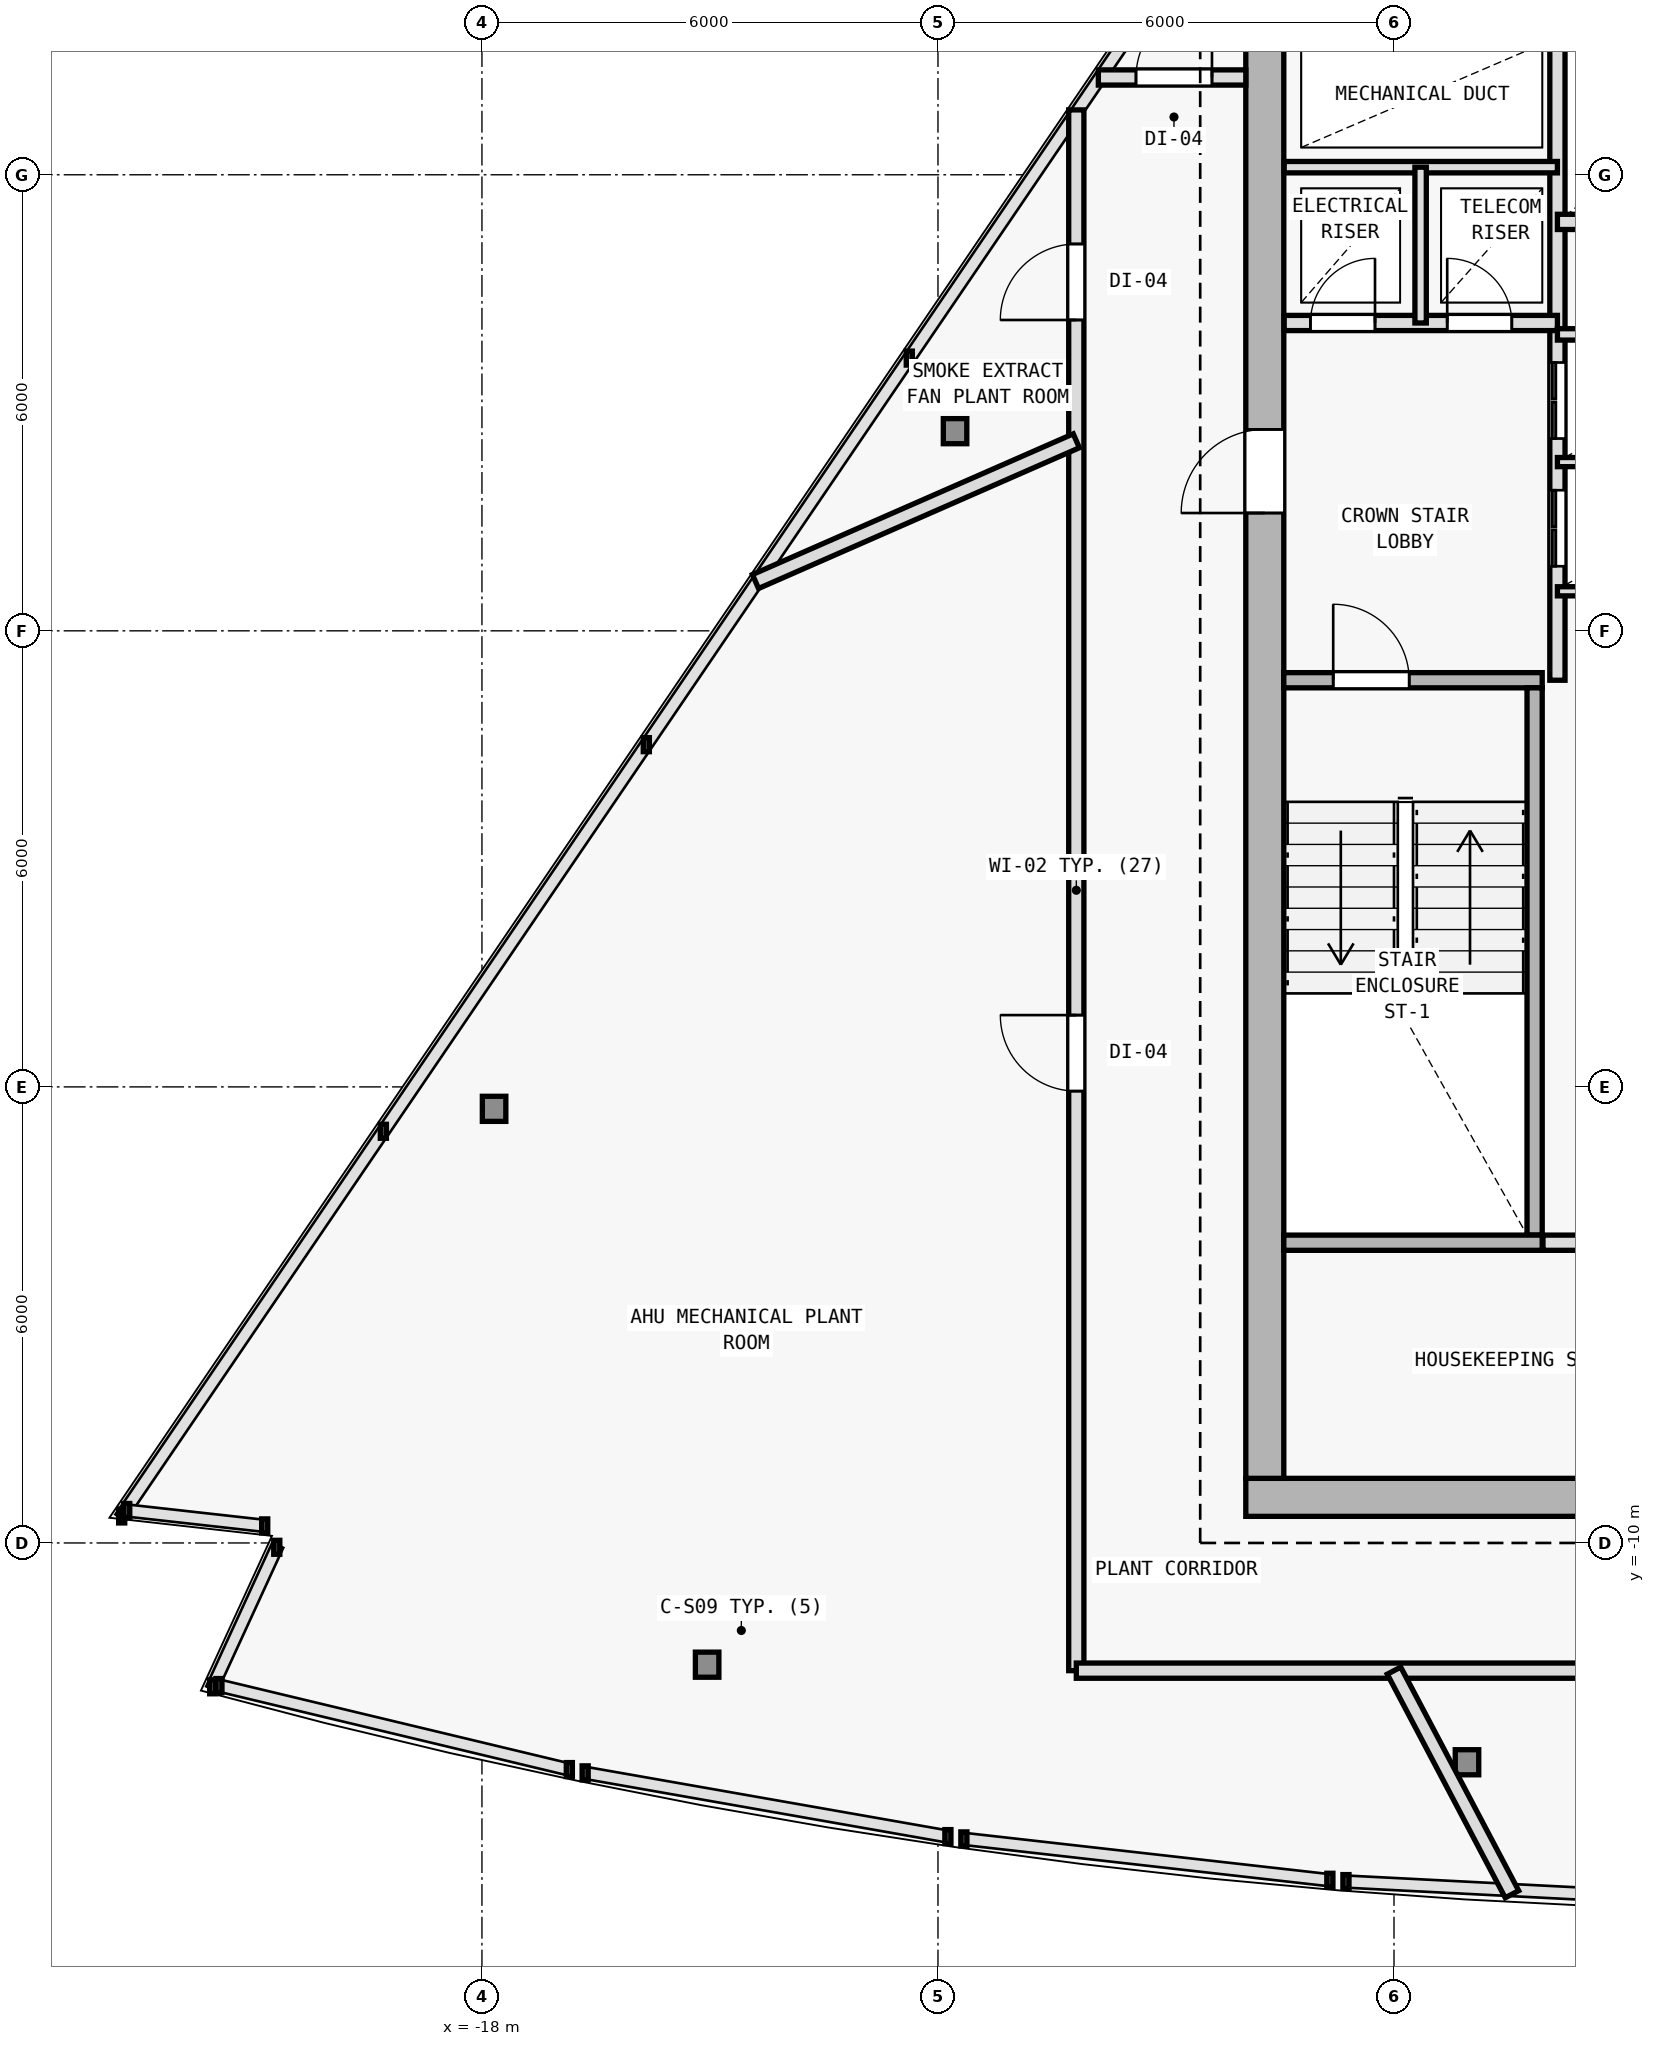
"""IFC4 building model, lengths in metres.
Left out: names, types, materials, properties, quantities, classifications, styles, units other than length and angle.
Written with IfcOpenShell. Run it as: python <this file> out.ifc"""

import sys

from ifc_helpers import new_model, si_unit, direction, frame, frame_2d, origin, origin_2d, place, context, subcontext, project, spatial, rectangle, i_section, extrude, element, fill, save


model = new_model("IFC4")
c1 = context("Model", 3, precision=1e-05, world=origin(), true_north=direction((0.0, 1.0)))
c2 = subcontext(c1, "Body", "Model", "MODEL_VIEW")
j1 = project(units=[si_unit("LENGTHUNIT", "METRE"), si_unit("PLANEANGLEUNIT", "RADIAN")], contexts=[c1])
p1 = place(None, origin())
s1 = spatial("IfcSite", under=j1, at=p1, CompositionType="ELEMENT")
p2 = place(p1, origin())
s2 = spatial("IfcBuilding", under=s1, at=p2, CompositionType="ELEMENT")
p3 = place(p2, frame((0.0, 0.0, 312.0)))
s3 = spatial("IfcBuildingStorey", under=s2, at=p3, CompositionType="ELEMENT", Elevation=312.0)
for number, where, z_axis, x_axis in (
    (1, (-7.7, -9.4, 0.0), (0.0, 0.0, 1.0), (1.0, 0.0, 0.0)),
    (2, (-7.7, 2.0, 0.0), (0.0, 0.0, 1.0), (1.0, 0.0, 0.0)),
):
    element("IfcColumn", number, at=place(p3, frame(where, z_axis=z_axis, x_axis=x_axis)), inside=s3, PredefinedType="COLUMN", context=c2, shape_type="SweptSolid", body=[
        extrude(i_section(OverallWidth=0.374, OverallDepth=0.372, WebThickness=0.012, FlangeThickness=0.02, FilletRadius=0.015, at=origin_2d()), origin(), (0.0, 0.0, 1.0), 3.6),
    ])
for number, where, z_axis, x_axis in (
    (3, (-15.037, -11.602, 0.0), (0.0, 0.0, 1.0), (1.0, 0.0, 0.0)),
    (4, (-5.04, -12.885, 0.0), (0.0, 0.0, 1.0), (1.0, 0.0, 0.0)),
    (5, (-17.84, -4.289, 0.0), (0.0, 0.0, 1.0), (1.0, 0.0, 0.0)),
    (6, (-11.775, 4.627, 0.0), (0.0, 0.0, 1.0), (1.0, 0.0, 0.0)),
):
    element("IfcColumn", number, at=place(p3, frame(where, z_axis=z_axis, x_axis=x_axis)), inside=s3, PredefinedType="COLUMN", context=c2, shape_type="SweptSolid", body=[
        extrude(i_section(OverallWidth=0.309, OverallDepth=0.33, WebThickness=0.011, FlangeThickness=0.019, FilletRadius=0.027, at=origin_2d()), origin(), (0.0, 0.0, 1.0), 3.6),
    ])
p4 = place(p3, frame((-7.95, -9.4, 0.0), z_axis=(0.0, 0.0, 1.0), x_axis=(1.0, 0.0, 0.0)))
e7 = element("IfcWall", 7, at=p4, inside=s3, PredefinedType="SHEAR", context=c2, shape_type="SweptSolid", body=[
    extrude(rectangle(XDim=15.9, YDim=0.5, at=frame_2d((7.95, 0.0))), origin(), (0.0, 0.0, 1.0), 3.34),
])
p5 = place(p4, frame((9.6, 0.0, 0.0)))
e8 = element("IfcOpeningElement", 8, at=p5, cuts=e7, PredefinedType="OPENING", context=c2, shape_type="SweptSolid", body=[
    extrude(rectangle(XDim=1.5, YDim=2.2, at=frame_2d((0.75, 1.1))), frame((0.0, 0.26, 0.0), z_axis=(0.0, -1.0, 0.0), x_axis=(1.0, 0.0, 0.0)), (0.0, 0.0, 1.0), 0.52),
])
p6 = place(p3, frame((-7.7, -9.15, 0.0), z_axis=(0.0, 0.0, 1.0), x_axis=(0.0, 1.0, 0.0)))
e9 = element("IfcWall", 9, at=p6, inside=s3, PredefinedType="SHEAR", context=c2, shape_type="SweptSolid", body=[
    extrude(rectangle(XDim=19.1, YDim=0.5, at=frame_2d((9.55, 0.0))), origin(), (0.0, 0.0, 1.0), 3.34),
])
p7 = place(p6, frame((12.7, 0.0, 0.0)))
e10 = element("IfcOpeningElement", 10, at=p7, cuts=e9, PredefinedType="OPENING", context=c2, shape_type="SweptSolid", body=[
    extrude(rectangle(XDim=1.1, YDim=2.15, at=frame_2d((0.55, 1.075))), frame((0.0, 0.26, 0.0), z_axis=(0.0, -1.0, 0.0), x_axis=(1.0, 0.0, 0.0)), (0.0, 0.0, 1.0), 0.52),
])
p8 = place(p3, frame((-7.45, 1.35, 0.0), z_axis=(0.0, 0.0, 1.0), x_axis=(1.0, 0.0, 0.0)))
e11 = element("IfcWall", 11, at=p8, inside=s3, PredefinedType="SOLIDWALL", context=c2, shape_type="SweptSolid", body=[
    extrude(rectangle(XDim=3.4, YDim=0.2, at=frame_2d((1.7, 0.0))), origin(), (0.0, 0.0, 1.0), 3.34),
])
p9 = place(p8, frame((0.65, 0.0, 0.0)))
e12 = element("IfcOpeningElement", 12, at=p9, cuts=e11, PredefinedType="OPENING", context=c2, shape_type="SweptSolid", body=[
    extrude(rectangle(XDim=1.0, YDim=2.15, at=frame_2d((0.5, 1.075))), frame((0.0, 0.11, 0.0), z_axis=(0.0, -1.0, 0.0), x_axis=(1.0, 0.0, 0.0)), (0.0, 0.0, 1.0), 0.22),
])
p10 = place(p3, frame((-4.15, -5.95, 0.0), z_axis=(0.0, 0.0, 1.0), x_axis=(0.0, 1.0, 0.0)))
e13 = element("IfcWall", 13, at=p10, inside=s3, PredefinedType="SOLIDWALL", context=c2, shape_type="SweptSolid", body=[
    extrude(rectangle(XDim=7.2, YDim=0.2, at=frame_2d((3.6, 0.0))), origin(), (0.0, 0.0, 1.0), 3.34),
])
p11 = place(p3, frame((-3.85, 1.35, 0.0), z_axis=(0.0, 0.0, 1.0), x_axis=(0.0, 1.0, 0.0)))
e14 = element("IfcWall", 14, at=p11, inside=s3, PredefinedType="SOLIDWALL", context=c2, shape_type="SweptSolid", body=[
    extrude(rectangle(XDim=8.595, YDim=0.2, at=frame_2d((4.297, 0.0))), origin(), (0.0, 0.0, 1.0), 3.34),
])
p12 = place(p11, frame((1.5, 0.0, 0.0)))
e15 = element("IfcOpeningElement", 15, at=p12, cuts=e14, PredefinedType="OPENING", context=c2, shape_type="SweptSolid", body=[
    extrude(rectangle(XDim=1.0, YDim=2.15, at=frame_2d((0.5, 1.075))), frame((0.0, 0.11, 0.0), z_axis=(0.0, -1.0, 0.0), x_axis=(1.0, 0.0, 0.0)), (0.0, 0.0, 1.0), 0.22),
])
p13 = place(p11, frame((3.18, 0.0, 0.0)))
e16 = element("IfcOpeningElement", 16, at=p13, cuts=e14, PredefinedType="OPENING", context=c2, shape_type="SweptSolid", body=[
    extrude(rectangle(XDim=1.0, YDim=2.15, at=frame_2d((0.5, 1.075))), frame((0.0, 0.11, 0.0), z_axis=(0.0, -1.0, 0.0), x_axis=(1.0, 0.0, 0.0)), (0.0, 0.0, 1.0), 0.22),
])
p14 = place(p3, frame((-7.445, 6.05, 0.0), z_axis=(0.0, 0.0, 1.0), x_axis=(1.0, 0.0, 0.0)))
e17 = element("IfcWall", 17, at=p14, inside=s3, PredefinedType="SOLIDWALL", context=c2, shape_type="SweptSolid", body=[
    extrude(rectangle(XDim=3.595, YDim=0.2, at=frame_2d((1.797, 0.0))), origin(), (0.0, 0.0, 1.0), 3.34),
])
p15 = place(p14, frame((0.345, 0.0, 0.0)))
e18 = element("IfcOpeningElement", 18, at=p15, cuts=e17, PredefinedType="OPENING", context=c2, shape_type="SweptSolid", body=[
    extrude(rectangle(XDim=0.85, YDim=2.1, at=frame_2d((0.425, 1.05))), frame((0.0, 0.11, 0.0), z_axis=(0.0, -1.0, 0.0), x_axis=(1.0, 0.0, 0.0)), (0.0, 0.0, 1.0), 0.22),
])
p16 = place(p14, frame((2.145, 0.0, 0.0)))
e19 = element("IfcOpeningElement", 19, at=p16, cuts=e17, PredefinedType="OPENING", context=c2, shape_type="SweptSolid", body=[
    extrude(rectangle(XDim=0.85, YDim=2.1, at=frame_2d((0.425, 1.05))), frame((0.0, 0.11, 0.0), z_axis=(0.0, -1.0, 0.0), x_axis=(1.0, 0.0, 0.0)), (0.0, 0.0, 1.0), 0.22),
])
p17 = place(p3, frame((-7.445, 8.1, 0.0), z_axis=(0.0, 0.0, 1.0), x_axis=(1.0, 0.0, 0.0)))
e20 = element("IfcWall", 20, at=p17, inside=s3, PredefinedType="PARTITIONING", context=c2, shape_type="SweptSolid", body=[
    extrude(rectangle(XDim=3.595, YDim=0.15, at=frame_2d((1.797, 0.0))), origin(), (0.0, 0.0, 1.0), 3.34),
])
p18 = place(p3, frame((-5.65, 6.05, 0.0), z_axis=(0.0, 0.0, 1.0), x_axis=(0.0, 1.0, 0.0)))
e21 = element("IfcWall", 21, at=p18, inside=s3, PredefinedType="PARTITIONING", context=c2, shape_type="SweptSolid", body=[
    extrude(rectangle(XDim=2.05, YDim=0.15, at=frame_2d((1.025, 0.0))), origin(), (0.0, 0.0, 1.0), 3.34),
])
for number, where, z_axis, x_axis in (
    (22, (-3.85, 2.52, 0.0), (0.0, 0.0, 1.0), (1.0, 0.0, 0.0)),
    (23, (-3.85, 4.22, 0.0), (0.0, 0.0, 1.0), (1.0, 0.0, 0.0)),
):
    element("IfcWall", number, at=place(p3, frame(where, z_axis=z_axis, x_axis=x_axis)), inside=s3, PredefinedType="PARTITIONING", context=c2, shape_type="SweptSolid", body=[
        extrude(rectangle(XDim=2.9, YDim=0.12, at=frame_2d((1.45, 0.0))), origin(), (0.0, 0.0, 1.0), 3.34),
    ])
p19 = place(p3, frame((-3.85, 5.9, 0.0), z_axis=(0.0, 0.0, 1.0), x_axis=(1.0, 0.0, 0.0)))
e24 = element("IfcWall", 24, at=p19, inside=s3, PredefinedType="PARTITIONING", context=c2, shape_type="SweptSolid", body=[
    extrude(rectangle(XDim=2.9, YDim=0.15, at=frame_2d((1.45, 0.0))), origin(), (0.0, 0.0, 1.0), 3.34),
])
p20 = place(p3, frame((-3.85, 7.38, 0.0), z_axis=(0.0, 0.0, 1.0), x_axis=(1.0, 0.0, 0.0)))
e25 = element("IfcWall", 25, at=p20, inside=s3, PredefinedType="SOLIDWALL", context=c2, shape_type="SweptSolid", body=[
    extrude(rectangle(XDim=2.9, YDim=0.2, at=frame_2d((1.45, 0.0))), origin(), (0.0, 0.0, 1.0), 3.34),
])
p21 = place(p20, frame((0.85, 0.0, 0.0)))
e26 = element("IfcOpeningElement", 26, at=p21, cuts=e25, PredefinedType="OPENING", context=c2, shape_type="SweptSolid", body=[
    extrude(rectangle(XDim=1.2, YDim=2.2, at=frame_2d((0.6, 1.1))), frame((0.0, 0.11, 0.0), z_axis=(0.0, -1.0, 0.0), x_axis=(1.0, 0.0, 0.0)), (0.0, 0.0, 1.0), 0.22),
])
p22 = place(p3, frame((-7.45, -6.05, 0.0), z_axis=(0.0, 0.0, 1.0), x_axis=(1.0, 0.0, 0.0)))
e27 = element("IfcWall", 27, at=p22, inside=s3, PredefinedType="SOLIDWALL", context=c2, shape_type="SweptSolid", body=[
    extrude(rectangle(XDim=3.4, YDim=0.2, at=frame_2d((1.7, 0.0))), origin(), (0.0, 0.0, 1.0), 3.34),
])
p23 = place(p3, frame((-4.04, -6.05, 0.0), z_axis=(0.0, 0.0, 1.0), x_axis=(1.0, 0.0, 0.0)))
e28 = element("IfcWall", 28, at=p23, inside=s3, PredefinedType="SOLIDWALL", context=c2, shape_type="SweptSolid", body=[
    extrude(rectangle(XDim=2.79, YDim=0.2, at=frame_2d((1.395, 0.0))), origin(), (0.0, 0.0, 1.0), 3.34),
])
p24 = place(p3, frame((-10.18, -11.68, 0.0), z_axis=(0.0, 0.0, 1.0), x_axis=(0.0, 1.0, 0.0)))
e29 = element("IfcWall", 29, at=p24, inside=s3, PredefinedType="SOLIDWALL", context=c2, shape_type="SweptSolid", body=[
    extrude(rectangle(XDim=20.533, YDim=0.2, at=frame_2d((10.267, 0.0))), origin(), (0.0, 0.0, 1.0), 2.995),
])
p25 = place(p24, frame((7.625, 0.0, 0.0)))
e30 = element("IfcOpeningElement", 30, at=p25, cuts=e29, PredefinedType="OPENING", context=c2, shape_type="SweptSolid", body=[
    extrude(rectangle(XDim=1.0, YDim=2.15, at=frame_2d((0.5, 1.075))), frame((0.0, 0.11, 0.0), z_axis=(0.0, -1.0, 0.0), x_axis=(1.0, 0.0, 0.0)), (0.0, 0.0, 1.0), 0.22),
])
p26 = place(p24, frame((17.77, 0.0, 0.0)))
e31 = element("IfcOpeningElement", 31, at=p26, cuts=e29, PredefinedType="OPENING", context=c2, shape_type="SweptSolid", body=[
    extrude(rectangle(XDim=1.0, YDim=2.15, at=frame_2d((0.5, 1.075))), frame((0.0, 0.11, 0.0), z_axis=(0.0, -1.0, 0.0), x_axis=(1.0, 0.0, 0.0)), (0.0, 0.0, 1.0), 0.22),
])
p27 = place(p3, frame((-10.18, -11.68, 0.0), z_axis=(0.0, 0.0, 1.0), x_axis=(1.0, 0.0, 0.0)))
e32 = element("IfcWall", 32, at=p27, inside=s3, PredefinedType="SOLIDWALL", context=c2, shape_type="SweptSolid", body=[
    extrude(rectangle(XDim=18.13, YDim=0.2, at=frame_2d((9.065, 0.0))), origin(), (0.0, 0.0, 1.0), 2.995),
])
p28 = place(p27, frame((10.628, 0.0, 0.0)))
e33 = element("IfcOpeningElement", 33, at=p28, cuts=e32, PredefinedType="OPENING", context=c2, shape_type="SweptSolid", body=[
    extrude(rectangle(XDim=1.0, YDim=2.15, at=frame_2d((0.5, 1.075))), frame((0.0, 0.11, 0.0), z_axis=(0.0, -1.0, 0.0), x_axis=(1.0, 0.0, 0.0)), (0.0, 0.0, 1.0), 0.22),
])
p29 = place(p3, frame((-9.89, 9.28, 0.0), z_axis=(0.0, 0.0, 1.0), x_axis=(1.0, 0.0, 0.0)))
e34 = element("IfcWall", 34, at=p29, inside=s3, PredefinedType="SOLIDWALL", context=c2, shape_type="SweptSolid", body=[
    extrude(rectangle(XDim=1.94, YDim=0.2, at=frame_2d((0.97, 0.0))), origin(), (0.0, 0.0, 1.0), 3.34),
])
p30 = place(p29, frame((0.495, 0.0, 0.0)))
e35 = element("IfcOpeningElement", 35, at=p30, cuts=e34, PredefinedType="OPENING", context=c2, shape_type="SweptSolid", body=[
    extrude(rectangle(XDim=1.0, YDim=2.15, at=frame_2d((0.5, 1.075))), frame((0.0, 0.11, 0.0), z_axis=(0.0, -1.0, 0.0), x_axis=(1.0, 0.0, 0.0)), (0.0, 0.0, 1.0), 0.22),
])
p31 = place(p3, frame((-14.401, 2.649, 0.0), z_axis=(0.0, 0.0, 1.0), x_axis=(0.915794703046, 0.401646687866, 0.0)))
e36 = element("IfcWall", 36, at=p31, inside=s3, PredefinedType="SOLIDWALL", context=c2, shape_type="SweptSolid", body=[
    extrude(rectangle(XDim=4.609, YDim=0.2, at=frame_2d((2.305, 0.0))), origin(), (0.0, 0.0, 1.0), 2.995),
])
p32 = place(p3, frame((-4.448, -14.622, 0.0), z_axis=(0.0, 0.0, 1.0), x_axis=(-0.466632626592, 0.884451237661, 0.0)))
e37 = element("IfcWall", 37, at=p32, inside=s3, PredefinedType="SOLIDWALL", context=c2, shape_type="SweptSolid", body=[
    extrude(rectangle(XDim=3.326, YDim=0.2, at=frame_2d((1.663, 0.0))), origin(), (0.0, 0.0, 1.0), 2.995),
])
p33 = place(p7, origin())
e38 = element("IfcDoor", 38, at=p33, inside=s3, OperationType="SINGLE_SWING_LEFT", PredefinedType="DOOR", context=c2, shape_type="SweptSolid", body=[
    extrude(rectangle(XDim=1.1, YDim=2.15, at=frame_2d((0.55, 1.075))), frame((0.0, 0.025, 0.0), z_axis=(0.0, -1.0, 0.0), x_axis=(1.0, 0.0, 0.0)), (0.0, 0.0, 1.0), 0.05),
])
fill(e10, e38)
p34 = place(p9, origin())
e39 = element("IfcDoor", 39, at=p34, inside=s3, OperationType="SINGLE_SWING_LEFT", PredefinedType="DOOR", context=c2, shape_type="SweptSolid", body=[
    extrude(rectangle(XDim=1.0, YDim=2.15, at=frame_2d((0.5, 1.075))), frame((0.0, 0.025, 0.0), z_axis=(0.0, -1.0, 0.0), x_axis=(1.0, 0.0, 0.0)), (0.0, 0.0, 1.0), 0.05),
])
fill(e12, e39)
p35 = place(p15, origin())
e40 = element("IfcDoor", 40, at=p35, inside=s3, OperationType="SINGLE_SWING_RIGHT", PredefinedType="DOOR", context=c2, shape_type="SweptSolid", body=[
    extrude(rectangle(XDim=0.85, YDim=2.1, at=frame_2d((0.425, 1.05))), frame((0.0, 0.025, 0.0), z_axis=(0.0, -1.0, 0.0), x_axis=(1.0, 0.0, 0.0)), (0.0, 0.0, 1.0), 0.05),
])
fill(e18, e40)
p36 = place(p16, origin())
e41 = element("IfcDoor", 41, at=p36, inside=s3, OperationType="SINGLE_SWING_LEFT", PredefinedType="DOOR", context=c2, shape_type="SweptSolid", body=[
    extrude(rectangle(XDim=0.85, YDim=2.1, at=frame_2d((0.425, 1.05))), frame((0.0, 0.025, 0.0), z_axis=(0.0, -1.0, 0.0), x_axis=(1.0, 0.0, 0.0)), (0.0, 0.0, 1.0), 0.05),
])
fill(e19, e41)
p37 = place(p12, origin())
e42 = element("IfcDoor", 42, at=p37, inside=s3, OperationType="DOUBLE_DOOR_SLIDING", PredefinedType="DOOR", context=c2, shape_type="SweptSolid", body=[
    extrude(rectangle(XDim=1.0, YDim=2.15, at=frame_2d((0.5, 1.075))), frame((0.0, 0.025, 0.0), z_axis=(0.0, -1.0, 0.0), x_axis=(1.0, 0.0, 0.0)), (0.0, 0.0, 1.0), 0.05),
])
fill(e15, e42)
p38 = place(p13, origin())
e43 = element("IfcDoor", 43, at=p38, inside=s3, OperationType="DOUBLE_DOOR_SLIDING", PredefinedType="DOOR", context=c2, shape_type="SweptSolid", body=[
    extrude(rectangle(XDim=1.0, YDim=2.15, at=frame_2d((0.5, 1.075))), frame((0.0, 0.025, 0.0), z_axis=(0.0, -1.0, 0.0), x_axis=(1.0, 0.0, 0.0)), (0.0, 0.0, 1.0), 0.05),
])
fill(e16, e43)
p39 = place(p25, origin())
e44 = element("IfcDoor", 44, at=p39, inside=s3, OperationType="SINGLE_SWING_RIGHT", PredefinedType="DOOR", context=c2, shape_type="SweptSolid", body=[
    extrude(rectangle(XDim=1.0, YDim=2.15, at=frame_2d((0.5, 1.075))), frame((0.0, 0.025, 0.0), z_axis=(0.0, -1.0, 0.0), x_axis=(1.0, 0.0, 0.0)), (0.0, 0.0, 1.0), 0.05),
])
fill(e30, e44)
p40 = place(p30, origin())
e45 = element("IfcDoor", 45, at=p40, inside=s3, OperationType="SINGLE_SWING_RIGHT", PredefinedType="DOOR", context=c2, shape_type="SweptSolid", body=[
    extrude(rectangle(XDim=1.0, YDim=2.15, at=frame_2d((0.5, 1.075))), frame((0.0, 0.025, 0.0), z_axis=(0.0, -1.0, 0.0), x_axis=(1.0, 0.0, 0.0)), (0.0, 0.0, 1.0), 0.05),
])
fill(e35, e45)
p41 = place(p26, origin())
e46 = element("IfcDoor", 46, at=p41, inside=s3, OperationType="SINGLE_SWING_LEFT", PredefinedType="DOOR", context=c2, shape_type="SweptSolid", body=[
    extrude(rectangle(XDim=1.0, YDim=2.15, at=frame_2d((0.5, 1.075))), frame((0.0, 0.025, 0.0), z_axis=(0.0, -1.0, 0.0), x_axis=(1.0, 0.0, 0.0)), (0.0, 0.0, 1.0), 0.05),
])
fill(e31, e46)
save(model, sys.argv[1])
